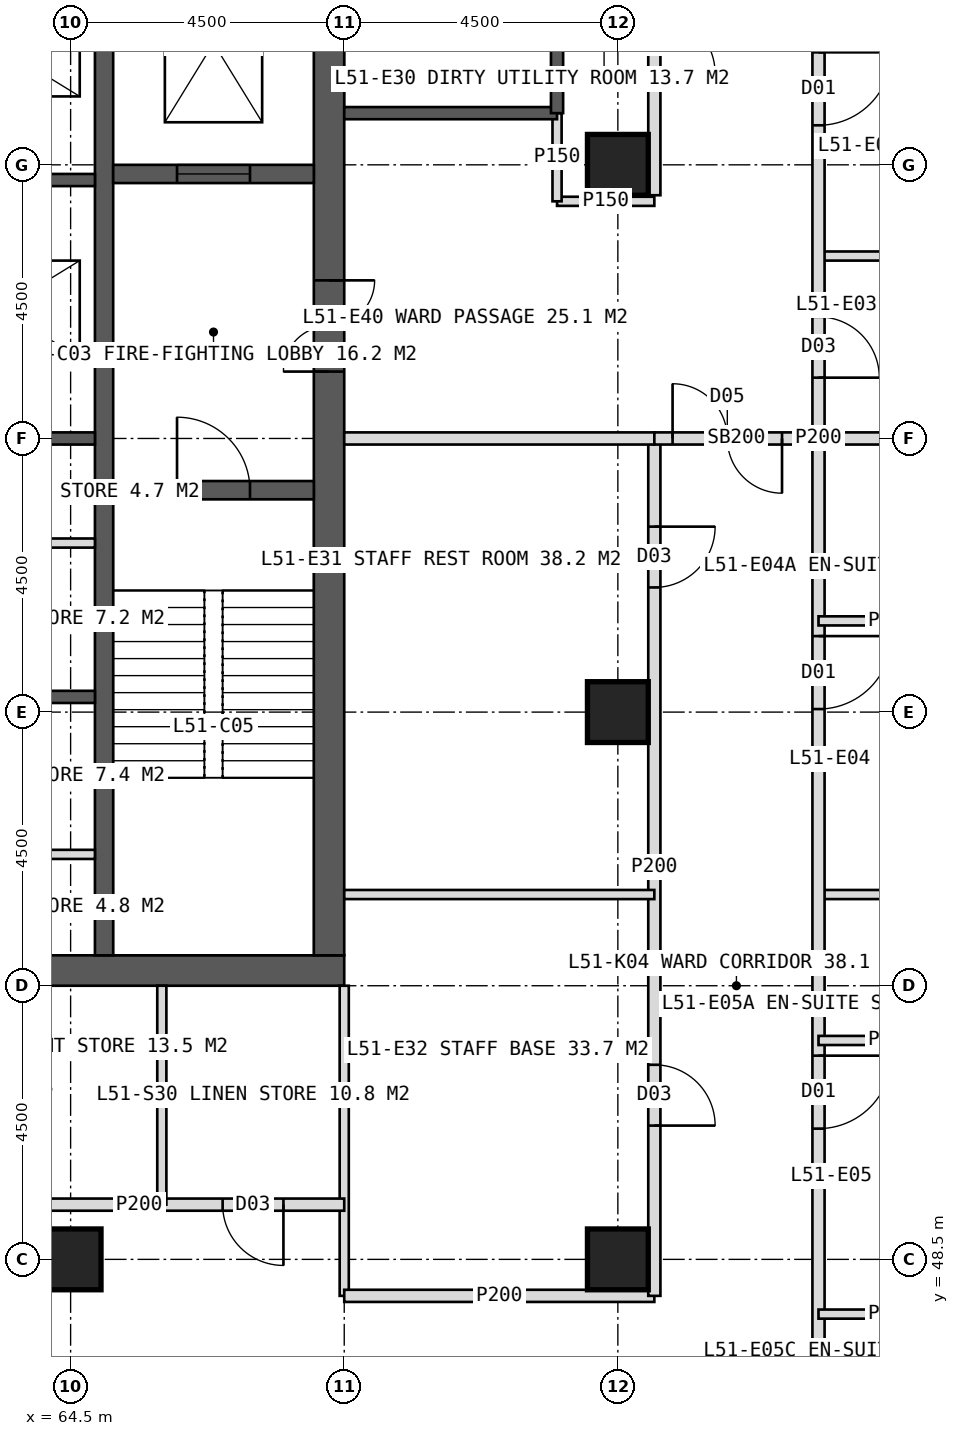
"""IFC4 building model, lengths in metres.
Left out: names, types, materials, properties, quantities, classifications, styles, units other than length and angle.
Written with IfcOpenShell. Run it as: python <this file> out.ifc"""

import sys

from ifc_helpers import new_model, si_unit, direction, frame, frame_2d, origin, origin_2d, place, context, subcontext, project, spatial, rectangle, hollow_rectangle, extrude, element, fill, save


model = new_model("IFC4")
c1 = context("Model", 3, precision=1e-05, world=origin(), true_north=direction((0.0, 1.0)))
c2 = subcontext(c1, "Body", "Model", "MODEL_VIEW")
j1 = project(units=[si_unit("LENGTHUNIT", "METRE"), si_unit("PLANEANGLEUNIT", "RADIAN")], contexts=[c1])
p1 = place(None, origin())
s1 = spatial("IfcSite", under=j1, at=p1, CompositionType="ELEMENT")
p2 = place(p1, origin())
s2 = spatial("IfcBuilding", under=s1, at=p2, CompositionType="ELEMENT")
p3 = place(p2, frame((0.0, 0.0, 213.0)))
s3 = spatial("IfcBuildingStorey", under=s2, at=p3, CompositionType="ELEMENT", Elevation=213.0)
p4 = place(p3, frame((51.0, 53.25, 0.0), z_axis=(0.0, 0.0, 1.0), x_axis=(1.0, 0.0, 0.0)))
e1 = element("IfcWall", 1, at=p4, inside=s3, PredefinedType="SHEAR", context=c2, shape_type="SweptSolid", body=[
    extrude(rectangle(XDim=18.0, YDim=0.5, at=frame_2d((9.0, 0.0))), origin(), (0.0, 0.0, 1.0), 4.0),
])
p5 = place(p4, frame((8.1, 0.0, 0.0)))
e2 = element("IfcOpeningElement", 2, at=p5, cuts=e1, PredefinedType="OPENING", context=c2, shape_type="SweptSolid", body=[
    extrude(rectangle(XDim=1.8, YDim=2.2, at=frame_2d((0.9, 1.1))), frame((0.0, 0.26, 0.0), z_axis=(0.0, -1.0, 0.0), x_axis=(1.0, 0.0, 0.0)), (0.0, 0.0, 1.0), 0.52),
])
p6 = place(p3, frame((68.75, 53.5, 0.0), z_axis=(0.0, 0.0, 1.0), x_axis=(0.0, 1.0, 0.0)))
e3 = element("IfcWall", 3, at=p6, inside=s3, PredefinedType="SHEAR", context=c2, shape_type="SweptSolid", body=[
    extrude(rectangle(XDim=17.0, YDim=0.5, at=frame_2d((8.5, 0.0))), origin(), (0.0, 0.0, 1.0), 4.0),
])
p7 = place(p6, frame((9.6, 0.0, 0.0)))
e4 = element("IfcOpeningElement", 4, at=p7, cuts=e3, PredefinedType="OPENING", context=c2, shape_type="SweptSolid", body=[
    extrude(rectangle(XDim=1.5, YDim=2.2, at=frame_2d((0.75, 1.1))), frame((0.0, 0.26, 0.0), z_axis=(0.0, -1.0, 0.0), x_axis=(1.0, 0.0, 0.0)), (0.0, 0.0, 1.0), 0.52),
])
p8 = place(p3, frame((65.05, 53.5, 0.0), z_axis=(0.0, 0.0, 1.0), x_axis=(0.0, 1.0, 0.0)))
e5 = element("IfcWall", 5, at=p8, inside=s3, PredefinedType="SHEAR", context=c2, shape_type="SweptSolid", body=[
    extrude(rectangle(XDim=17.0, YDim=0.3, at=frame_2d((8.5, 0.0))), origin(), (0.0, 0.0, 1.0), 4.0),
])
for number, where, z_axis, x_axis in (
    (6, (61.85, 57.75, 0.0), (0.0, 0.0, 1.0), (1.0, 0.0, 0.0)),
    (7, (61.85, 62.0, 0.0), (0.0, 0.0, 1.0), (1.0, 0.0, 0.0)),
    (8, (61.85, 66.25, 0.0), (0.0, 0.0, 1.0), (1.0, 0.0, 0.0)),
):
    element("IfcWall", number, at=place(p3, frame(where, z_axis=z_axis, x_axis=x_axis)), inside=s3, PredefinedType="SHEAR", context=c2, shape_type="SweptSolid", body=[
        extrude(rectangle(XDim=3.05, YDim=0.2, at=frame_2d((1.525, 0.0))), origin(), (0.0, 0.0, 1.0), 4.0),
    ])
p9 = place(p3, frame((65.2, 61.15, 0.0), z_axis=(0.0, 0.0, 1.0), x_axis=(1.0, 0.0, 0.0)))
e9 = element("IfcWall", 9, at=p9, inside=s3, PredefinedType="SHEAR", context=c2, shape_type="SweptSolid", body=[
    extrude(rectangle(XDim=3.3, YDim=0.3, at=frame_2d((1.65, 0.0))), origin(), (0.0, 0.0, 1.0), 4.0),
])
p10 = place(p9, frame((1.05, 0.0, 0.0)))
e10 = element("IfcOpeningElement", 10, at=p10, cuts=e9, PredefinedType="OPENING", context=c2, shape_type="SweptSolid", body=[
    extrude(rectangle(XDim=1.2, YDim=2.1, at=frame_2d((0.6, 1.05))), frame((0.0, 0.16, 0.0), z_axis=(0.0, -1.0, 0.0), x_axis=(1.0, 0.0, 0.0)), (0.0, 0.0, 1.0), 0.32),
])
p11 = place(p3, frame((65.2, 66.35, 0.0), z_axis=(0.0, 0.0, 1.0), x_axis=(1.0, 0.0, 0.0)))
e11 = element("IfcWall", 11, at=p11, inside=s3, PredefinedType="SHEAR", context=c2, shape_type="SweptSolid", body=[
    extrude(rectangle(XDim=3.3, YDim=0.3, at=frame_2d((1.65, 0.0))), origin(), (0.0, 0.0, 1.0), 4.0),
])
p12 = place(p11, frame((1.05, 0.0, 0.0)))
e12 = element("IfcOpeningElement", 12, at=p12, cuts=e11, PredefinedType="OPENING", context=c2, shape_type="SweptSolid", body=[
    extrude(rectangle(XDim=1.2, YDim=2.2, at=frame_2d((0.6, 1.1))), frame((0.0, 0.16, 0.0), z_axis=(0.0, -1.0, 0.0), x_axis=(1.0, 0.0, 0.0)), (0.0, 0.0, 1.0), 0.32),
])
for number, where, z_axis, x_axis in (
    (13, (73.5, 48.5, 0.0), (0.0, 0.0, 1.0), (1.0, 0.0, 0.0)),
    (14, (64.5, 48.5, 0.0), (0.0, 0.0, 1.0), (1.0, 0.0, 0.0)),
    (15, (73.5, 57.5, 0.0), (0.0, 0.0, 1.0), (1.0, 0.0, 0.0)),
    (16, (73.5, 66.5, 0.0), (0.0, 0.0, 1.0), (1.0, 0.0, 0.0)),
):
    element("IfcColumn", number, at=place(p3, frame(where, z_axis=z_axis, x_axis=x_axis)), inside=s3, PredefinedType="COLUMN", context=c2, shape_type="SweptSolid", body=[
        extrude(hollow_rectangle(XDim=1.0, YDim=1.0, WallThickness=0.1, at=origin_2d()), origin(), (0.0, 0.0, 1.0), 4.0),
    ])
p13 = place(p3, frame((69.0, 53.0, 0.0), z_axis=(0.0, 0.0, 1.0), x_axis=(0.0, -1.0, 0.0)))
e17 = element("IfcWall", 17, at=p13, inside=s3, PredefinedType="PARTITIONING", context=c2, shape_type="SweptSolid", body=[
    extrude(rectangle(XDim=5.1, YDim=0.15, at=frame_2d((2.55, 0.0))), origin(), (0.0, 0.0, 1.0), 3.75),
])
p14 = place(p3, frame((74.1, 47.9, 0.0), z_axis=(0.0, 0.0, 1.0), x_axis=(-1.0, 0.0, 0.0)))
e18 = element("IfcWall", 18, at=p14, inside=s3, PredefinedType="PARTITIONING", context=c2, shape_type="SweptSolid", body=[
    extrude(rectangle(XDim=5.1, YDim=0.2, at=frame_2d((2.55, 0.0))), origin(), (0.0, 0.0, 1.0), 3.75),
])
p15 = place(p3, frame((69.0, 49.4, 0.0), z_axis=(0.0, 0.0, 1.0), x_axis=(-1.0, 0.0, 0.0)))
e19 = element("IfcWall", 19, at=p15, inside=s3, PredefinedType="PARTITIONING", context=c2, shape_type="SweptSolid", body=[
    extrude(rectangle(XDim=6.75, YDim=0.2, at=frame_2d((3.375, 0.0))), origin(), (0.0, 0.0, 1.0), 3.75),
])
p16 = place(p15, frame((1.0, 0.0, 0.0)))
e20 = element("IfcOpeningElement", 20, at=p16, cuts=e19, PredefinedType="OPENING", context=c2, shape_type="SweptSolid", body=[
    extrude(rectangle(XDim=1.0, YDim=2.1, at=frame_2d((0.5, 1.05))), frame((0.0, 0.11, 0.0), z_axis=(0.0, -1.0, 0.0), x_axis=(1.0, 0.0, 0.0)), (0.0, 0.0, 1.0), 0.22),
])
p17 = place(p15, frame((5.425, 0.0, 0.0)))
e21 = element("IfcOpeningElement", 21, at=p17, cuts=e19, PredefinedType="OPENING", context=c2, shape_type="SweptSolid", body=[
    extrude(rectangle(XDim=1.0, YDim=2.1, at=frame_2d((0.5, 1.05))), frame((0.0, 0.11, 0.0), z_axis=(0.0, -1.0, 0.0), x_axis=(1.0, 0.0, 0.0)), (0.0, 0.0, 1.0), 0.22),
])
p18 = place(p3, frame((66.0, 53.0, 0.0), z_axis=(0.0, 0.0, 1.0), x_axis=(0.0, -1.0, 0.0)))
e22 = element("IfcWall", 22, at=p18, inside=s3, PredefinedType="PARTITIONING", context=c2, shape_type="SweptSolid", body=[
    extrude(rectangle(XDim=3.6, YDim=0.15, at=frame_2d((1.8, 0.0))), origin(), (0.0, 0.0, 1.0), 3.75),
])
p19 = place(p3, frame((76.8, 65.0, 0.0), z_axis=(0.0, 0.0, 1.0), x_axis=(1.0, 0.0, 0.0)))
e23 = element("IfcWall", 23, at=p19, inside=s3, PredefinedType="PARTITIONING", context=c2, shape_type="SweptSolid", body=[
    extrude(rectangle(XDim=5.55, YDim=0.15, at=frame_2d((2.775, 0.0))), origin(), (0.0, 0.0, 1.0), 3.75),
])
p20 = place(p3, frame((76.8, 62.0, 0.0), z_axis=(0.0, 0.0, 1.0), x_axis=(1.0, 0.0, 0.0)))
e24 = element("IfcWall", 24, at=p20, inside=s3, PredefinedType="SOLIDWALL", context=c2, shape_type="SweptSolid", body=[
    extrude(rectangle(XDim=5.55, YDim=0.2, at=frame_2d((2.775, 0.0))), origin(), (0.0, 0.0, 1.0), 2.95),
])
p21 = place(p3, frame((76.8, 54.5, 0.0), z_axis=(0.0, 0.0, 1.0), x_axis=(1.0, 0.0, 0.0)))
e25 = element("IfcWall", 25, at=p21, inside=s3, PredefinedType="PARTITIONING", context=c2, shape_type="SweptSolid", body=[
    extrude(rectangle(XDim=5.55, YDim=0.15, at=frame_2d((2.775, 0.0))), origin(), (0.0, 0.0, 1.0), 3.75),
])
p22 = place(p3, frame((76.8, 78.8, 0.0), z_axis=(0.0, 0.0, 1.0), x_axis=(0.0, -1.0, 0.0)))
e26 = element("IfcWall", 26, at=p22, inside=s3, PredefinedType="PARTITIONING", context=c2, shape_type="SweptSolid", body=[
    extrude(rectangle(XDim=33.6, YDim=0.2, at=frame_2d((16.8, 0.0))), origin(), (0.0, 0.0, 1.0), 3.75),
])
p23 = place(p22, frame((3.25, 0.0, 0.0)))
e27 = element("IfcOpeningElement", 27, at=p23, cuts=e26, PredefinedType="OPENING", context=c2, shape_type="SweptSolid", body=[
    extrude(rectangle(XDim=1.2, YDim=2.2, at=frame_2d((0.6, 1.1))), frame((0.0, 0.11, 0.0), z_axis=(0.0, -1.0, 0.0), x_axis=(1.0, 0.0, 0.0)), (0.0, 0.0, 1.0), 0.22),
])
p24 = place(p22, frame((10.45, 0.0, 0.0)))
e28 = element("IfcOpeningElement", 28, at=p24, cuts=e26, PredefinedType="OPENING", context=c2, shape_type="SweptSolid", body=[
    extrude(rectangle(XDim=1.2, YDim=2.2, at=frame_2d((0.6, 1.1))), frame((0.0, 0.11, 0.0), z_axis=(0.0, -1.0, 0.0), x_axis=(1.0, 0.0, 0.0)), (0.0, 0.0, 1.0), 0.22),
])
p25 = place(p22, frame((14.8, 0.0, 0.0)))
e29 = element("IfcOpeningElement", 29, at=p25, cuts=e26, PredefinedType="OPENING", context=c2, shape_type="SweptSolid", body=[
    extrude(rectangle(XDim=1.0, YDim=2.1, at=frame_2d((0.5, 1.05))), frame((0.0, 0.11, 0.0), z_axis=(0.0, -1.0, 0.0), x_axis=(1.0, 0.0, 0.0)), (0.0, 0.0, 1.0), 0.22),
])
p26 = place(p22, frame((20.05, 0.0, 0.0)))
e30 = element("IfcOpeningElement", 30, at=p26, cuts=e26, PredefinedType="OPENING", context=c2, shape_type="SweptSolid", body=[
    extrude(rectangle(XDim=1.2, YDim=2.2, at=frame_2d((0.6, 1.1))), frame((0.0, 0.11, 0.0), z_axis=(0.0, -1.0, 0.0), x_axis=(1.0, 0.0, 0.0)), (0.0, 0.0, 1.0), 0.22),
])
p27 = place(p22, frame((26.95, 0.0, 0.0)))
e31 = element("IfcOpeningElement", 31, at=p27, cuts=e26, PredefinedType="OPENING", context=c2, shape_type="SweptSolid", body=[
    extrude(rectangle(XDim=1.2, YDim=2.2, at=frame_2d((0.6, 1.1))), frame((0.0, 0.11, 0.0), z_axis=(0.0, -1.0, 0.0), x_axis=(1.0, 0.0, 0.0)), (0.0, 0.0, 1.0), 0.22),
])
for number, where, z_axis, x_axis in (
    (32, (76.8, 59.0, 0.0), (0.0, 0.0, 1.0), (1.0, 0.0, 0.0)),
    (33, (76.8, 52.1, 0.0), (0.0, 0.0, 1.0), (1.0, 0.0, 0.0)),
    (34, (76.8, 47.6, 0.0), (0.0, 0.0, 1.0), (1.0, 0.0, 0.0)),
):
    element("IfcWall", number, at=place(p3, frame(where, z_axis=z_axis, x_axis=x_axis)), inside=s3, PredefinedType="PARTITIONING", context=c2, shape_type="SweptSolid", body=[
        extrude(rectangle(XDim=2.4, YDim=0.15, at=frame_2d((1.2, 0.0))), origin(), (0.0, 0.0, 1.0), 3.75),
    ])
p28 = place(p3, frame((74.1, 74.6, 0.0), z_axis=(0.0, 0.0, 1.0), x_axis=(0.0, -1.0, 0.0)))
e35 = element("IfcWall", 35, at=p28, inside=s3, PredefinedType="PARTITIONING", context=c2, shape_type="SweptSolid", body=[
    extrude(rectangle(XDim=8.6, YDim=0.2, at=frame_2d((4.3, 0.0))), origin(), (0.0, 0.0, 1.0), 3.75),
])
p29 = place(p28, frame((5.6, 0.0, 0.0)))
e36 = element("IfcOpeningElement", 36, at=p29, cuts=e35, PredefinedType="OPENING", context=c2, shape_type="SweptSolid", body=[
    extrude(rectangle(XDim=1.0, YDim=2.1, at=frame_2d((0.5, 1.05))), frame((0.0, 0.11, 0.0), z_axis=(0.0, -1.0, 0.0), x_axis=(1.0, 0.0, 0.0)), (0.0, 0.0, 1.0), 0.22),
])
p30 = place(p3, frame((74.1, 62.0, 0.0), z_axis=(0.0, 0.0, 1.0), x_axis=(0.0, -1.0, 0.0)))
e37 = element("IfcWall", 37, at=p30, inside=s3, PredefinedType="PARTITIONING", context=c2, shape_type="SweptSolid", body=[
    extrude(rectangle(XDim=14.1, YDim=0.2, at=frame_2d((7.05, 0.0))), origin(), (0.0, 0.0, 1.0), 3.75),
])
p31 = place(p30, frame((1.45, 0.0, 0.0)))
e38 = element("IfcOpeningElement", 38, at=p31, cuts=e37, PredefinedType="OPENING", context=c2, shape_type="SweptSolid", body=[
    extrude(rectangle(XDim=1.0, YDim=2.1, at=frame_2d((0.5, 1.05))), frame((0.0, 0.11, 0.0), z_axis=(0.0, -1.0, 0.0), x_axis=(1.0, 0.0, 0.0)), (0.0, 0.0, 1.0), 0.22),
])
p32 = place(p30, frame((10.3, 0.0, 0.0)))
e39 = element("IfcOpeningElement", 39, at=p32, cuts=e37, PredefinedType="OPENING", context=c2, shape_type="SweptSolid", body=[
    extrude(rectangle(XDim=1.0, YDim=2.1, at=frame_2d((0.5, 1.05))), frame((0.0, 0.11, 0.0), z_axis=(0.0, -1.0, 0.0), x_axis=(1.0, 0.0, 0.0)), (0.0, 0.0, 1.0), 0.22),
])
p33 = place(p3, frame((72.5, 65.9, 0.0), z_axis=(0.0, 0.0, 1.0), x_axis=(1.0, 0.0, 0.0)))
e40 = element("IfcWall", 40, at=p33, inside=s3, PredefinedType="PARTITIONING", context=c2, shape_type="SweptSolid", body=[
    extrude(rectangle(XDim=1.6, YDim=0.15, at=frame_2d((0.8, 0.0))), origin(), (0.0, 0.0, 1.0), 3.75),
])
p34 = place(p3, frame((69.0, 62.0, 0.0), z_axis=(0.0, 0.0, 1.0), x_axis=(1.0, 0.0, 0.0)))
e41 = element("IfcWall", 41, at=p34, inside=s3, PredefinedType="SOLIDWALL", context=c2, shape_type="SweptSolid", body=[
    extrude(rectangle(XDim=5.1, YDim=0.2, at=frame_2d((2.55, 0.0))), origin(), (0.0, 0.0, 1.0), 2.95),
])
p35 = place(p3, frame((69.0, 54.5, 0.0), z_axis=(0.0, 0.0, 1.0), x_axis=(1.0, 0.0, 0.0)))
e42 = element("IfcWall", 42, at=p35, inside=s3, PredefinedType="PARTITIONING", context=c2, shape_type="SweptSolid", body=[
    extrude(rectangle(XDim=5.1, YDim=0.15, at=frame_2d((2.55, 0.0))), origin(), (0.0, 0.0, 1.0), 3.75),
])
p36 = place(p3, frame((74.1, 62.0, 0.0), z_axis=(0.0, 0.0, 1.0), x_axis=(1.0, 0.0, 0.0)))
e43 = element("IfcWall", 43, at=p36, inside=s3, PredefinedType="SOLIDWALL", context=c2, shape_type="SweptSolid", body=[
    extrude(rectangle(XDim=2.7, YDim=0.2, at=frame_2d((1.35, 0.0))), origin(), (0.0, 0.0, 1.0), 2.95),
])
p37 = place(p36, frame((0.3, 0.0, 0.0)))
e44 = element("IfcOpeningElement", 44, at=p37, cuts=e43, PredefinedType="OPENING", context=c2, shape_type="SweptSolid", body=[
    extrude(rectangle(XDim=1.8, YDim=2.2, at=frame_2d((0.9, 1.1))), frame((0.0, 0.11, 0.0), z_axis=(0.0, -1.0, 0.0), x_axis=(1.0, 0.0, 0.0)), (0.0, 0.0, 1.0), 0.22),
])
for number, where, z_axis, x_axis in (
    (45, (61.85, 55.16, 0.0), (0.0, 0.0, 1.0), (1.0, 0.0, 0.0)),
    (46, (61.85, 60.28, 0.0), (0.0, 0.0, 1.0), (1.0, 0.0, 0.0)),
):
    element("IfcWall", number, at=place(p3, frame(where, z_axis=z_axis, x_axis=x_axis)), inside=s3, PredefinedType="PARTITIONING", context=c2, shape_type="SweptSolid", body=[
        extrude(rectangle(XDim=3.05, YDim=0.15, at=frame_2d((1.525, 0.0))), origin(), (0.0, 0.0, 1.0), 3.75),
    ])
p38 = place(p3, frame((72.5, 65.9, 0.0), z_axis=(0.0, 0.0, 1.0), x_axis=(0.0, 1.0, 0.0)))
e47 = element("IfcWall", 47, at=p38, inside=s3, PredefinedType="PARTITIONING", context=c2, shape_type="SweptSolid", body=[
    extrude(rectangle(XDim=1.45, YDim=0.15, at=frame_2d((0.725, 0.0))), origin(), (0.0, 0.0, 1.0), 3.75),
])
p39 = place(p3, frame((69.0, 67.35, 0.0), z_axis=(0.0, 0.0, 1.0), x_axis=(1.0, 0.0, 0.0)))
e48 = element("IfcWall", 48, at=p39, inside=s3, PredefinedType="SOLIDWALL", context=c2, shape_type="SweptSolid", body=[
    extrude(rectangle(XDim=3.5, YDim=0.2, at=frame_2d((1.75, 0.0))), origin(), (0.0, 0.0, 1.0), 3.75),
])
p40 = place(p3, frame((72.5, 67.35, 0.0), z_axis=(0.0, 0.0, 1.0), x_axis=(0.0, 1.0, 0.0)))
e49 = element("IfcWall", 49, at=p40, inside=s3, PredefinedType="SOLIDWALL", context=c2, shape_type="SweptSolid", body=[
    extrude(rectangle(XDim=7.75, YDim=0.2, at=frame_2d((3.875, 0.0))), origin(), (0.0, 0.0, 1.0), 3.75),
])
p41 = place(p16, origin())
e50 = element("IfcDoor", 50, at=p41, inside=s3, OperationType="SINGLE_SWING_LEFT", PredefinedType="DOOR", context=c2, shape_type="SweptSolid", body=[
    extrude(rectangle(XDim=1.0, YDim=2.1, at=frame_2d((0.5, 1.05))), frame((0.0, 0.025, 0.0), z_axis=(0.0, -1.0, 0.0), x_axis=(1.0, 0.0, 0.0)), (0.0, 0.0, 1.0), 0.05),
])
fill(e20, e50)
p42 = place(p24, origin())
e51 = element("IfcDoor", 51, at=p42, inside=s3, OperationType="SINGLE_SWING_LEFT", PredefinedType="DOOR", context=c2, shape_type="SweptSolid", body=[
    extrude(rectangle(XDim=1.2, YDim=2.2, at=frame_2d((0.6, 1.1))), frame((0.0, 0.025, 0.0), z_axis=(0.0, -1.0, 0.0), x_axis=(1.0, 0.0, 0.0)), (0.0, 0.0, 1.0), 0.05),
])
fill(e28, e51)
p43 = place(p25, origin())
e52 = element("IfcDoor", 52, at=p43, inside=s3, OperationType="SINGLE_SWING_RIGHT", PredefinedType="DOOR", context=c2, shape_type="SweptSolid", body=[
    extrude(rectangle(XDim=1.0, YDim=2.1, at=frame_2d((0.5, 1.05))), frame((0.0, 0.025, 0.0), z_axis=(0.0, -1.0, 0.0), x_axis=(1.0, 0.0, 0.0)), (0.0, 0.0, 1.0), 0.05),
])
fill(e29, e52)
p44 = place(p26, origin())
e53 = element("IfcDoor", 53, at=p44, inside=s3, OperationType="SINGLE_SWING_LEFT", PredefinedType="DOOR", context=c2, shape_type="SweptSolid", body=[
    extrude(rectangle(XDim=1.2, YDim=2.2, at=frame_2d((0.6, 1.1))), frame((0.0, 0.025, 0.0), z_axis=(0.0, -1.0, 0.0), x_axis=(1.0, 0.0, 0.0)), (0.0, 0.0, 1.0), 0.05),
])
fill(e30, e53)
p45 = place(p27, origin())
e54 = element("IfcDoor", 54, at=p45, inside=s3, OperationType="SINGLE_SWING_LEFT", PredefinedType="DOOR", context=c2, shape_type="SweptSolid", body=[
    extrude(rectangle(XDim=1.2, YDim=2.2, at=frame_2d((0.6, 1.1))), frame((0.0, 0.025, 0.0), z_axis=(0.0, -1.0, 0.0), x_axis=(1.0, 0.0, 0.0)), (0.0, 0.0, 1.0), 0.05),
])
fill(e31, e54)
p46 = place(p29, origin())
e55 = element("IfcDoor", 55, at=p46, inside=s3, OperationType="SINGLE_SWING_RIGHT", PredefinedType="DOOR", context=c2, shape_type="SweptSolid", body=[
    extrude(rectangle(XDim=1.0, YDim=2.1, at=frame_2d((0.5, 1.05))), frame((0.0, 0.025, 0.0), z_axis=(0.0, -1.0, 0.0), x_axis=(1.0, 0.0, 0.0)), (0.0, 0.0, 1.0), 0.05),
])
fill(e36, e55)
p47 = place(p31, origin())
e56 = element("IfcDoor", 56, at=p47, inside=s3, OperationType="SINGLE_SWING_LEFT", PredefinedType="DOOR", context=c2, shape_type="SweptSolid", body=[
    extrude(rectangle(XDim=1.0, YDim=2.1, at=frame_2d((0.5, 1.05))), frame((0.0, 0.025, 0.0), z_axis=(0.0, -1.0, 0.0), x_axis=(1.0, 0.0, 0.0)), (0.0, 0.0, 1.0), 0.05),
])
fill(e38, e56)
p48 = place(p32, origin())
e57 = element("IfcDoor", 57, at=p48, inside=s3, OperationType="SINGLE_SWING_RIGHT", PredefinedType="DOOR", context=c2, shape_type="SweptSolid", body=[
    extrude(rectangle(XDim=1.0, YDim=2.1, at=frame_2d((0.5, 1.05))), frame((0.0, 0.025, 0.0), z_axis=(0.0, -1.0, 0.0), x_axis=(1.0, 0.0, 0.0)), (0.0, 0.0, 1.0), 0.05),
])
fill(e39, e57)
p49 = place(p37, origin())
e58 = element("IfcDoor", 58, at=p49, inside=s3, OperationType="DOUBLE_DOOR_DOUBLE_SWING", PredefinedType="DOOR", context=c2, shape_type="SweptSolid", body=[
    extrude(rectangle(XDim=1.8, YDim=2.2, at=frame_2d((0.9, 1.1))), frame((0.0, 0.025, 0.0), z_axis=(0.0, -1.0, 0.0), x_axis=(1.0, 0.0, 0.0)), (0.0, 0.0, 1.0), 0.05),
])
fill(e44, e58)
p50 = place(p7, origin())
e59 = element("IfcDoor", 59, at=p50, inside=s3, OperationType="DOUBLE_DOOR_SINGLE_SWING", PredefinedType="DOOR", context=c2, shape_type="SweptSolid", body=[
    extrude(rectangle(XDim=1.5, YDim=2.2, at=frame_2d((0.75, 1.1))), frame((0.0, 0.025, 0.0), z_axis=(0.0, -1.0, 0.0), x_axis=(1.0, 0.0, 0.0)), (0.0, 0.0, 1.0), 0.05),
])
fill(e4, e59)
p51 = place(p10, origin())
e60 = element("IfcDoor", 60, at=p51, inside=s3, OperationType="SINGLE_SWING_LEFT", PredefinedType="DOOR", context=c2, shape_type="SweptSolid", body=[
    extrude(rectangle(XDim=1.2, YDim=2.1, at=frame_2d((0.6, 1.05))), frame((0.0, 0.025, 0.0), z_axis=(0.0, -1.0, 0.0), x_axis=(1.0, 0.0, 0.0)), (0.0, 0.0, 1.0), 0.05),
])
fill(e10, e60)
p52 = place(p12, origin())
e61 = element("IfcDoor", 61, at=p52, inside=s3, OperationType="SLIDING_TO_LEFT", PredefinedType="DOOR", context=c2, shape_type="SweptSolid", body=[
    extrude(rectangle(XDim=1.2, YDim=2.2, at=frame_2d((0.6, 1.1))), frame((0.0, 0.025, 0.0), z_axis=(0.0, -1.0, 0.0), x_axis=(1.0, 0.0, 0.0)), (0.0, 0.0, 1.0), 0.05),
])
fill(e12, e61)
save(model, sys.argv[1])
